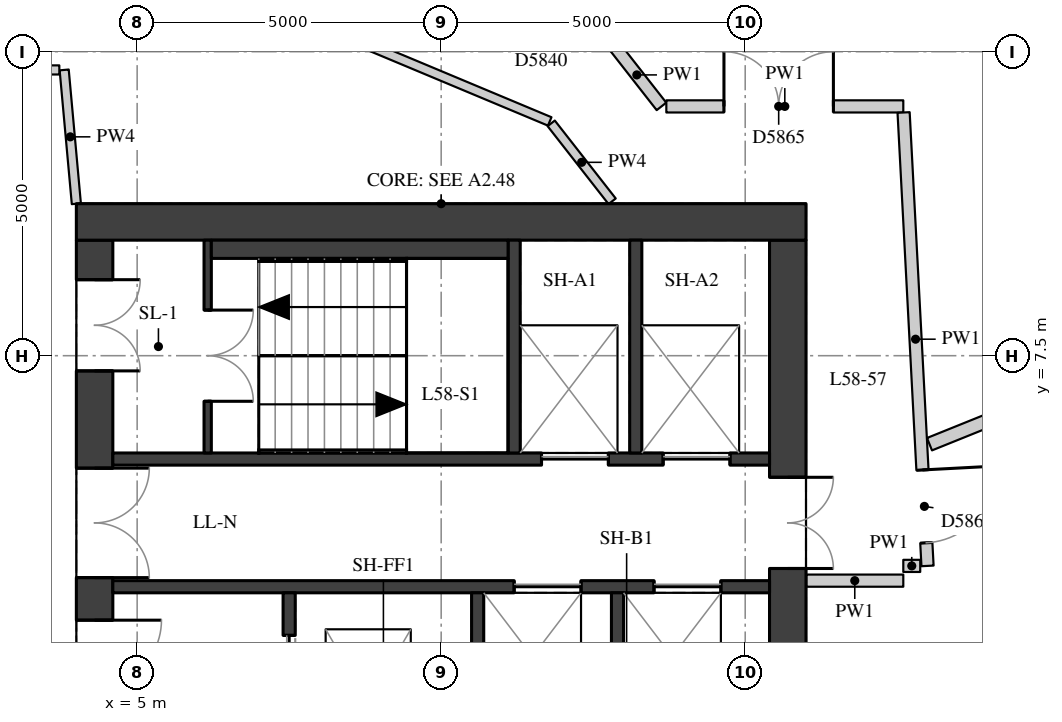
"""IFC4 building model, lengths in metres.
Left out: names, types, materials, properties, quantities, classifications, styles, units other than length and angle.
Written with IfcOpenShell. Run it as: python <this file> out.ifc"""

import sys

from ifc_helpers import new_model, si_unit, direction, frame, frame_2d, origin, place, context, subcontext, project, spatial, rectangle, extrude, element, fill, save


model = new_model("IFC4")
c1 = context("Model", 3, precision=1e-05, world=origin(), true_north=direction((0.0, 1.0)))
c2 = subcontext(c1, "Body", "Model", "MODEL_VIEW")
j1 = project(units=[si_unit("LENGTHUNIT", "METRE"), si_unit("PLANEANGLEUNIT", "RADIAN")], contexts=[c1])
p1 = place(None, origin())
s1 = spatial("IfcSite", under=j1, at=p1, CompositionType="ELEMENT")
p2 = place(p1, origin())
s2 = spatial("IfcBuilding", under=s1, at=p2, CompositionType="ELEMENT")
p3 = place(p2, frame((0.0, 0.0, 205.7)))
s3 = spatial("IfcBuildingStorey", under=s2, at=p3, CompositionType="ELEMENT", Elevation=205.7)
p4 = place(p3, frame((4.3, -9.4, 0.0), z_axis=(0.0, 0.0, 1.0), x_axis=(0.0, 1.0, 0.0)))
e1 = element("IfcWall", 1, at=p4, inside=s3, PredefinedType="SHEAR", context=c2, shape_type="SweptSolid", body=[
    extrude(rectangle(XDim=18.8, YDim=0.6, at=frame_2d((9.4, 0.0))), origin(), (0.0, 0.0, 1.0), 3.02),
])
p5 = place(p4, frame((0.65, 0.0, 0.0)))
e2 = element("IfcOpeningElement", 2, at=p5, cuts=e1, PredefinedType="OPENING", context=c2, shape_type="SweptSolid", body=[
    extrude(rectangle(XDim=1.5, YDim=2.1, at=frame_2d((0.75, 1.05))), frame((0.0, 0.31, 0.0), z_axis=(0.0, -1.0, 0.0), x_axis=(1.0, 0.0, 0.0)), (0.0, 0.0, 1.0), 0.62),
])
p6 = place(p4, frame((3.75, 0.0, 0.0)))
e3 = element("IfcOpeningElement", 3, at=p6, cuts=e1, PredefinedType="OPENING", context=c2, shape_type="SweptSolid", body=[
    extrude(rectangle(XDim=1.8, YDim=2.1, at=frame_2d((0.9, 1.05))), frame((0.0, 0.31, 0.0), z_axis=(0.0, -1.0, 0.0), x_axis=(1.0, 0.0, 0.0)), (0.0, 0.0, 1.0), 0.62),
])
p7 = place(p4, frame((6.25, 0.0, 0.0)))
e4 = element("IfcOpeningElement", 4, at=p7, cuts=e1, PredefinedType="OPENING", context=c2, shape_type="SweptSolid", body=[
    extrude(rectangle(XDim=1.1, YDim=2.1, at=frame_2d((0.55, 1.05))), frame((0.0, 0.31, 0.0), z_axis=(0.0, -1.0, 0.0), x_axis=(1.0, 0.0, 0.0)), (0.0, 0.0, 1.0), 0.62),
])
p8 = place(p4, frame((8.9, 0.0, 0.0)))
e5 = element("IfcOpeningElement", 5, at=p8, cuts=e1, PredefinedType="OPENING", context=c2, shape_type="SweptSolid", body=[
    extrude(rectangle(XDim=1.0, YDim=2.1, at=frame_2d((0.5, 1.05))), frame((0.0, 0.31, 0.0), z_axis=(0.0, -1.0, 0.0), x_axis=(1.0, 0.0, 0.0)), (0.0, 0.0, 1.0), 0.62),
])
p9 = place(p4, frame((11.45, 0.0, 0.0)))
e6 = element("IfcOpeningElement", 6, at=p9, cuts=e1, PredefinedType="OPENING", context=c2, shape_type="SweptSolid", body=[
    extrude(rectangle(XDim=1.1, YDim=2.1, at=frame_2d((0.55, 1.05))), frame((0.0, 0.31, 0.0), z_axis=(0.0, -1.0, 0.0), x_axis=(1.0, 0.0, 0.0)), (0.0, 0.0, 1.0), 0.62),
])
p10 = place(p4, frame((13.25, 0.0, 0.0)))
e7 = element("IfcOpeningElement", 7, at=p10, cuts=e1, PredefinedType="OPENING", context=c2, shape_type="SweptSolid", body=[
    extrude(rectangle(XDim=1.8, YDim=2.1, at=frame_2d((0.9, 1.05))), frame((0.0, 0.31, 0.0), z_axis=(0.0, -1.0, 0.0), x_axis=(1.0, 0.0, 0.0)), (0.0, 0.0, 1.0), 0.62),
])
p11 = place(p4, frame((16.65, 0.0, 0.0)))
e8 = element("IfcOpeningElement", 8, at=p11, cuts=e1, PredefinedType="OPENING", context=c2, shape_type="SweptSolid", body=[
    extrude(rectangle(XDim=1.5, YDim=2.1, at=frame_2d((0.75, 1.05))), frame((0.0, 0.31, 0.0), z_axis=(0.0, -1.0, 0.0), x_axis=(1.0, 0.0, 0.0)), (0.0, 0.0, 1.0), 0.62),
])
p12 = place(p3, frame((15.7, -9.4, 0.0), z_axis=(0.0, 0.0, 1.0), x_axis=(0.0, 1.0, 0.0)))
e9 = element("IfcWall", 9, at=p12, inside=s3, PredefinedType="SHEAR", context=c2, shape_type="SweptSolid", body=[
    extrude(rectangle(XDim=18.8, YDim=0.6, at=frame_2d((9.4, 0.0))), origin(), (0.0, 0.0, 1.0), 3.02),
])
p13 = place(p12, frame((13.4, 0.0, 0.0)))
e10 = element("IfcOpeningElement", 10, at=p13, cuts=e9, PredefinedType="OPENING", context=c2, shape_type="SweptSolid", body=[
    extrude(rectangle(XDim=1.5, YDim=2.1, at=frame_2d((0.75, 1.05))), frame((0.0, 0.31, 0.0), z_axis=(0.0, -1.0, 0.0), x_axis=(1.0, 0.0, 0.0)), (0.0, 0.0, 1.0), 0.62),
])
p14 = place(p12, frame((3.9, 0.0, 0.0)))
e11 = element("IfcOpeningElement", 11, at=p14, cuts=e9, PredefinedType="OPENING", context=c2, shape_type="SweptSolid", body=[
    extrude(rectangle(XDim=1.5, YDim=2.1, at=frame_2d((0.75, 1.05))), frame((0.0, 0.31, 0.0), z_axis=(0.0, -1.0, 0.0), x_axis=(1.0, 0.0, 0.0)), (0.0, 0.0, 1.0), 0.62),
])
p15 = place(p3, frame((4.0, 9.7, 0.0), z_axis=(0.0, 0.0, 1.0), x_axis=(1.0, 0.0, 0.0)))
e12 = element("IfcWall", 12, at=p15, inside=s3, PredefinedType="SHEAR", context=c2, shape_type="SweptSolid", body=[
    extrude(rectangle(XDim=12.0, YDim=0.6, at=frame_2d((6.0, 0.0))), origin(), (0.0, 0.0, 1.0), 3.02),
])
p16 = place(p3, frame((4.6, 5.8, 0.0), z_axis=(0.0, 0.0, 1.0), x_axis=(1.0, 0.0, 0.0)))
e13 = element("IfcWall", 13, at=p16, inside=s3, PredefinedType="SHEAR", context=c2, shape_type="SweptSolid", body=[
    extrude(rectangle(XDim=10.8, YDim=0.2, at=frame_2d((5.4, 0.0))), origin(), (0.0, 0.0, 1.0), 3.02),
])
p17 = place(p16, frame((7.05, 0.0, 0.0)))
e14 = element("IfcOpeningElement", 14, at=p17, cuts=e13, PredefinedType="OPENING", context=c2, shape_type="SweptSolid", body=[
    extrude(rectangle(XDim=1.1, YDim=2.1, at=frame_2d((0.55, 1.05))), frame((0.0, 0.11, 0.0), z_axis=(0.0, -1.0, 0.0), x_axis=(1.0, 0.0, 0.0)), (0.0, 0.0, 1.0), 0.22),
])
p18 = place(p16, frame((9.05, 0.0, 0.0)))
e15 = element("IfcOpeningElement", 15, at=p18, cuts=e13, PredefinedType="OPENING", context=c2, shape_type="SweptSolid", body=[
    extrude(rectangle(XDim=1.1, YDim=2.1, at=frame_2d((0.55, 1.05))), frame((0.0, 0.11, 0.0), z_axis=(0.0, -1.0, 0.0), x_axis=(1.0, 0.0, 0.0)), (0.0, 0.0, 1.0), 0.22),
])
p19 = place(p3, frame((4.6, 3.7, 0.0), z_axis=(0.0, 0.0, 1.0), x_axis=(1.0, 0.0, 0.0)))
e16 = element("IfcWall", 16, at=p19, inside=s3, PredefinedType="SHEAR", context=c2, shape_type="SweptSolid", body=[
    extrude(rectangle(XDim=10.8, YDim=0.2, at=frame_2d((5.4, 0.0))), origin(), (0.0, 0.0, 1.0), 3.02),
])
p20 = place(p19, frame((6.6, 0.0, 0.0)))
e17 = element("IfcOpeningElement", 17, at=p20, cuts=e16, PredefinedType="OPENING", context=c2, shape_type="SweptSolid", body=[
    extrude(rectangle(XDim=1.1, YDim=2.1, at=frame_2d((0.55, 1.05))), frame((0.0, 0.11, 0.0), z_axis=(0.0, -1.0, 0.0), x_axis=(1.0, 0.0, 0.0)), (0.0, 0.0, 1.0), 0.22),
])
p21 = place(p19, frame((8.9, 0.0, 0.0)))
e18 = element("IfcOpeningElement", 18, at=p21, cuts=e16, PredefinedType="OPENING", context=c2, shape_type="SweptSolid", body=[
    extrude(rectangle(XDim=1.1, YDim=2.1, at=frame_2d((0.55, 1.05))), frame((0.0, 0.11, 0.0), z_axis=(0.0, -1.0, 0.0), x_axis=(1.0, 0.0, 0.0)), (0.0, 0.0, 1.0), 0.22),
])
for number, where, z_axis, x_axis in (
    (19, (11.2, 5.9, 0.0), (0.0, 0.0, 1.0), (0.0, 1.0, 0.0)),
    (20, (13.2, 5.9, 0.0), (0.0, 0.0, 1.0), (0.0, 1.0, 0.0)),
):
    element("IfcWall", number, at=place(p3, frame(where, z_axis=z_axis, x_axis=x_axis)), inside=s3, PredefinedType="SHEAR", context=c2, shape_type="SweptSolid", body=[
        extrude(rectangle(XDim=3.5, YDim=0.2, at=frame_2d((1.75, 0.0))), origin(), (0.0, 0.0, 1.0), 3.02),
    ])
p22 = place(p3, frame((7.5, 1.1, 0.0), z_axis=(0.0, 0.0, 1.0), x_axis=(0.0, 1.0, 0.0)))
e21 = element("IfcWall", 21, at=p22, inside=s3, PredefinedType="SHEAR", context=c2, shape_type="SweptSolid", body=[
    extrude(rectangle(XDim=2.5, YDim=0.2, at=frame_2d((1.25, 0.0))), origin(), (0.0, 0.0, 1.0), 3.02),
])
p23 = place(p22, frame((0.7, 0.0, 0.0)))
e22 = element("IfcOpeningElement", 22, at=p23, cuts=e21, PredefinedType="OPENING", context=c2, shape_type="SweptSolid", body=[
    extrude(rectangle(XDim=1.1, YDim=2.1, at=frame_2d((0.55, 1.05))), frame((0.0, 0.11, 0.0), z_axis=(0.0, -1.0, 0.0), x_axis=(1.0, 0.0, 0.0)), (0.0, 0.0, 1.0), 0.22),
])
for number, where, z_axis, x_axis in (
    (23, (10.6, 1.1, 0.0), (0.0, 0.0, 1.0), (0.0, 1.0, 0.0)),
    (24, (12.9, 1.1, 0.0), (0.0, 0.0, 1.0), (0.0, 1.0, 0.0)),
):
    element("IfcWall", number, at=place(p3, frame(where, z_axis=z_axis, x_axis=x_axis)), inside=s3, PredefinedType="SHEAR", context=c2, shape_type="SweptSolid", body=[
        extrude(rectangle(XDim=2.5, YDim=0.2, at=frame_2d((1.25, 0.0))), origin(), (0.0, 0.0, 1.0), 3.02),
    ])
p24 = place(p3, frame((6.16, 5.9, 0.0), z_axis=(0.0, 0.0, 1.0), x_axis=(0.0, 1.0, 0.0)))
e25 = element("IfcWall", 25, at=p24, inside=s3, PredefinedType="SHEAR", context=c2, shape_type="SweptSolid", body=[
    extrude(rectangle(XDim=3.5, YDim=0.12, at=frame_2d((1.75, 0.0))), origin(), (0.0, 0.0, 1.0), 3.02),
])
p25 = place(p24, frame((0.85, 0.0, 0.0)))
e26 = element("IfcOpeningElement", 26, at=p25, cuts=e25, PredefinedType="OPENING", context=c2, shape_type="SweptSolid", body=[
    extrude(rectangle(XDim=1.5, YDim=2.1, at=frame_2d((0.75, 1.05))), frame((0.0, 0.07, 0.0), z_axis=(0.0, -1.0, 0.0), x_axis=(1.0, 0.0, 0.0)), (0.0, 0.0, 1.0), 0.14),
])
p26 = place(p3, frame((6.22, 9.25, 0.0), z_axis=(0.0, 0.0, 1.0), x_axis=(1.0, 0.0, 0.0)))
e27 = element("IfcWall", 27, at=p26, inside=s3, PredefinedType="PARTITIONING", context=c2, shape_type="SweptSolid", body=[
    extrude(rectangle(XDim=4.88, YDim=0.3, at=frame_2d((2.44, 0.0))), origin(), (0.0, 0.0, 1.0), 3.02),
])
p27 = place(p3, frame((12.812, 12.636, 0.0), z_axis=(0.0, 0.0, 1.0), x_axis=(0.616123044723, -0.787649918277, 0.0)))
e28 = element("IfcWall", 28, at=p27, inside=s3, PredefinedType="PARTITIONING", context=c2, shape_type="SweptSolid", body=[
    extrude(rectangle(XDim=1.315, YDim=0.2, at=frame_2d((0.658, 0.0))), origin(), (0.0, 0.0, 1.0), 3.02),
])
p28 = place(p3, frame((13.703, 11.6, 0.0), z_axis=(0.0, 0.0, 1.0), x_axis=(1.0, 0.0, 0.0)))
e29 = element("IfcWall", 29, at=p28, inside=s3, PredefinedType="PARTITIONING", context=c2, shape_type="SweptSolid", body=[
    extrude(rectangle(XDim=3.897, YDim=0.2, at=frame_2d((1.949, 0.0))), origin(), (0.0, 0.0, 1.0), 3.02),
])
p29 = place(p28, frame((0.948, 0.0, 0.0)))
e30 = element("IfcOpeningElement", 30, at=p29, cuts=e29, PredefinedType="OPENING", context=c2, shape_type="SweptSolid", body=[
    extrude(rectangle(XDim=1.8, YDim=2.1, at=frame_2d((0.9, 1.05))), frame((0.0, 0.11, 0.0), z_axis=(0.0, -1.0, 0.0), x_axis=(1.0, 0.0, 0.0)), (0.0, 0.0, 1.0), 0.22),
])
p30 = place(p3, frame((17.605, 11.5, 0.0), z_axis=(0.0, 0.0, 1.0), x_axis=(0.052701255232, -0.998610323248, 0.0)))
e31 = element("IfcWall", 31, at=p30, inside=s3, PredefinedType="PARTITIONING", context=c2, shape_type="SweptSolid", body=[
    extrude(rectangle(XDim=7.468, YDim=0.2, at=frame_2d((3.734, 0.0))), origin(), (0.0, 0.0, 1.0), 3.02),
])
p31 = place(p30, frame((5.887, 0.0, 0.0)))
e32 = element("IfcOpeningElement", 32, at=p31, cuts=e31, PredefinedType="OPENING", context=c2, shape_type="SweptSolid", body=[
    extrude(rectangle(XDim=1.2, YDim=2.1, at=frame_2d((0.6, 1.05))), frame((0.0, 0.11, 0.0), z_axis=(0.0, -1.0, 0.0), x_axis=(1.0, 0.0, 0.0)), (0.0, 0.0, 1.0), 0.22),
])
p32 = place(p3, frame((17.878, 4.043, 0.0), z_axis=(0.0, 0.0, 1.0), x_axis=(-1.0, 0.0, 0.0)))
e33 = element("IfcWall", 33, at=p32, inside=s3, PredefinedType="PARTITIONING", context=c2, shape_type="SweptSolid", body=[
    extrude(rectangle(XDim=0.278, YDim=0.2, at=frame_2d((0.139, 0.0))), origin(), (0.0, 0.0, 1.0), 3.02),
])
p33 = place(p3, frame((17.6, 3.8, 0.0), z_axis=(0.0, 0.0, 1.0), x_axis=(-1.0, 0.0, 0.0)))
e34 = element("IfcWall", 34, at=p33, inside=s3, PredefinedType="PARTITIONING", context=c2, shape_type="SweptSolid", body=[
    extrude(rectangle(XDim=1.596, YDim=0.2, at=frame_2d((0.798, 0.0))), origin(), (0.0, 0.0, 1.0), 3.02),
])
p34 = place(p3, frame((4.0, 9.999, 0.0), z_axis=(0.0, 0.0, 1.0), x_axis=(-0.090475982725, 0.995898637689, 0.0)))
e35 = element("IfcWall", 35, at=p34, inside=s3, PredefinedType="PARTITIONING", context=c2, shape_type="SweptSolid", body=[
    extrude(rectangle(XDim=2.21, YDim=0.15, at=frame_2d((1.105, 0.0))), origin(), (0.0, 0.0, 1.0), 3.02),
])
p35 = place(p3, frame((3.72, 12.2, 0.0), z_axis=(0.0, 0.0, 1.0), x_axis=(-1.0, 0.0, 0.0)))
e36 = element("IfcWall", 36, at=p35, inside=s3, PredefinedType="PARTITIONING", context=c2, shape_type="SweptSolid", body=[
    extrude(rectangle(XDim=2.32, YDim=0.15, at=frame_2d((1.16, 0.0))), origin(), (0.0, 0.0, 1.0), 3.02),
])
p36 = place(p3, frame((5.128, 14.138, 0.0), z_axis=(0.0, 0.0, 1.0), x_axis=(0.922514397623, -0.385962674591, 0.0)))
e37 = element("IfcWall", 37, at=p36, inside=s3, PredefinedType="PARTITIONING", context=c2, shape_type="SweptSolid", body=[
    extrude(rectangle(XDim=7.216, YDim=0.15, at=frame_2d((3.608, 0.0))), origin(), (0.0, 0.0, 1.0), 3.02),
])
p37 = place(p3, frame((11.81, 11.321, 0.0), z_axis=(0.0, 0.0, 1.0), x_axis=(0.615964296608, -0.787774069962, 0.0)))
e38 = element("IfcWall", 38, at=p37, inside=s3, PredefinedType="PARTITIONING", context=c2, shape_type="SweptSolid", body=[
    extrude(rectangle(XDim=1.627, YDim=0.15, at=frame_2d((0.813, 0.0))), origin(), (0.0, 0.0, 1.0), 3.02),
])
p38 = place(p3, frame((24.295, 8.571, 0.0), z_axis=(0.0, 0.0, 1.0), x_axis=(-0.927395972896, -0.374081153571, 0.0)))
e39 = element("IfcWall", 39, at=p38, inside=s3, PredefinedType="PARTITIONING", context=c2, shape_type="SweptSolid", body=[
    extrude(rectangle(XDim=6.755, YDim=0.22, at=frame_2d((3.377, 0.0))), origin(), (0.0, 0.0, 1.0), 3.02),
])
p39 = place(p9, origin())
e40 = element("IfcDoor", 40, at=p39, inside=s3, OperationType="SINGLE_SWING_LEFT", PredefinedType="DOOR", context=c2, shape_type="SweptSolid", body=[
    extrude(rectangle(XDim=1.1, YDim=2.1, at=frame_2d((0.55, 1.05))), frame((0.0, 0.025, 0.0), z_axis=(0.0, -1.0, 0.0), x_axis=(1.0, 0.0, 0.0)), (0.0, 0.0, 1.0), 0.05),
])
fill(e6, e40)
p40 = place(p10, origin())
e41 = element("IfcDoor", 41, at=p40, inside=s3, OperationType="DOUBLE_DOOR_SINGLE_SWING", PredefinedType="DOOR", context=c2, shape_type="SweptSolid", body=[
    extrude(rectangle(XDim=1.8, YDim=2.1, at=frame_2d((0.9, 1.05))), frame((0.0, 0.025, 0.0), z_axis=(0.0, -1.0, 0.0), x_axis=(1.0, 0.0, 0.0)), (0.0, 0.0, 1.0), 0.05),
])
fill(e7, e41)
p41 = place(p11, origin())
e42 = element("IfcDoor", 42, at=p41, inside=s3, OperationType="DOUBLE_DOOR_SINGLE_SWING", PredefinedType="DOOR", context=c2, shape_type="SweptSolid", body=[
    extrude(rectangle(XDim=1.5, YDim=2.1, at=frame_2d((0.75, 1.05))), frame((0.0, 0.025, 0.0), z_axis=(0.0, -1.0, 0.0), x_axis=(1.0, 0.0, 0.0)), (0.0, 0.0, 1.0), 0.05),
])
fill(e8, e42)
p42 = place(p13, origin())
e43 = element("IfcDoor", 43, at=p42, inside=s3, OperationType="DOUBLE_DOOR_SINGLE_SWING", PredefinedType="DOOR", context=c2, shape_type="SweptSolid", body=[
    extrude(rectangle(XDim=1.5, YDim=2.1, at=frame_2d((0.75, 1.05))), frame((0.0, 0.025, 0.0), z_axis=(0.0, -1.0, 0.0), x_axis=(1.0, 0.0, 0.0)), (0.0, 0.0, 1.0), 0.05),
])
fill(e10, e43)
p43 = place(p25, origin())
e44 = element("IfcDoor", 44, at=p43, inside=s3, OperationType="DOUBLE_DOOR_SINGLE_SWING", PredefinedType="DOOR", context=c2, shape_type="SweptSolid", body=[
    extrude(rectangle(XDim=1.5, YDim=2.1, at=frame_2d((0.75, 1.05))), frame((0.0, 0.025, 0.0), z_axis=(0.0, -1.0, 0.0), x_axis=(1.0, 0.0, 0.0)), (0.0, 0.0, 1.0), 0.05),
])
fill(e26, e44)
p44 = place(p17, origin())
e45 = element("IfcDoor", 45, at=p44, inside=s3, OperationType="DOUBLE_DOOR_SLIDING", PredefinedType="DOOR", context=c2, shape_type="SweptSolid", body=[
    extrude(rectangle(XDim=1.1, YDim=2.1, at=frame_2d((0.55, 1.05))), frame((0.0, 0.025, 0.0), z_axis=(0.0, -1.0, 0.0), x_axis=(1.0, 0.0, 0.0)), (0.0, 0.0, 1.0), 0.05),
])
fill(e14, e45)
p45 = place(p18, origin())
e46 = element("IfcDoor", 46, at=p45, inside=s3, OperationType="DOUBLE_DOOR_SLIDING", PredefinedType="DOOR", context=c2, shape_type="SweptSolid", body=[
    extrude(rectangle(XDim=1.1, YDim=2.1, at=frame_2d((0.55, 1.05))), frame((0.0, 0.025, 0.0), z_axis=(0.0, -1.0, 0.0), x_axis=(1.0, 0.0, 0.0)), (0.0, 0.0, 1.0), 0.05),
])
fill(e15, e46)
p46 = place(p20, origin())
e47 = element("IfcDoor", 47, at=p46, inside=s3, OperationType="DOUBLE_DOOR_SLIDING", PredefinedType="DOOR", context=c2, shape_type="SweptSolid", body=[
    extrude(rectangle(XDim=1.1, YDim=2.1, at=frame_2d((0.55, 1.05))), frame((0.0, 0.025, 0.0), z_axis=(0.0, -1.0, 0.0), x_axis=(1.0, 0.0, 0.0)), (0.0, 0.0, 1.0), 0.05),
])
fill(e17, e47)
p47 = place(p21, origin())
e48 = element("IfcDoor", 48, at=p47, inside=s3, OperationType="DOUBLE_DOOR_SLIDING", PredefinedType="DOOR", context=c2, shape_type="SweptSolid", body=[
    extrude(rectangle(XDim=1.1, YDim=2.1, at=frame_2d((0.55, 1.05))), frame((0.0, 0.025, 0.0), z_axis=(0.0, -1.0, 0.0), x_axis=(1.0, 0.0, 0.0)), (0.0, 0.0, 1.0), 0.05),
])
fill(e18, e48)
p48 = place(p23, origin())
e49 = element("IfcDoor", 49, at=p48, inside=s3, OperationType="DOUBLE_DOOR_SLIDING", PredefinedType="DOOR", context=c2, shape_type="SweptSolid", body=[
    extrude(rectangle(XDim=1.1, YDim=2.1, at=frame_2d((0.55, 1.05))), frame((0.0, 0.025, 0.0), z_axis=(0.0, -1.0, 0.0), x_axis=(1.0, 0.0, 0.0)), (0.0, 0.0, 1.0), 0.05),
])
fill(e22, e49)
p49 = place(p31, origin())
e50 = element("IfcDoor", 50, at=p49, inside=s3, OperationType="SINGLE_SWING_LEFT", PredefinedType="DOOR", context=c2, shape_type="SweptSolid", body=[
    extrude(rectangle(XDim=1.2, YDim=2.1, at=frame_2d((0.6, 1.05))), frame((0.0, 0.025, 0.0), z_axis=(0.0, -1.0, 0.0), x_axis=(1.0, 0.0, 0.0)), (0.0, 0.0, 1.0), 0.05),
])
fill(e32, e50)
p50 = place(p29, origin())
e51 = element("IfcDoor", 51, at=p50, inside=s3, OperationType="DOUBLE_DOOR_SINGLE_SWING", PredefinedType="DOOR", context=c2, shape_type="SweptSolid", body=[
    extrude(rectangle(XDim=1.8, YDim=2.1, at=frame_2d((0.9, 1.05))), frame((0.0, 0.025, 0.0), z_axis=(0.0, -1.0, 0.0), x_axis=(1.0, 0.0, 0.0)), (0.0, 0.0, 1.0), 0.05),
])
fill(e30, e51)
save(model, sys.argv[1])
